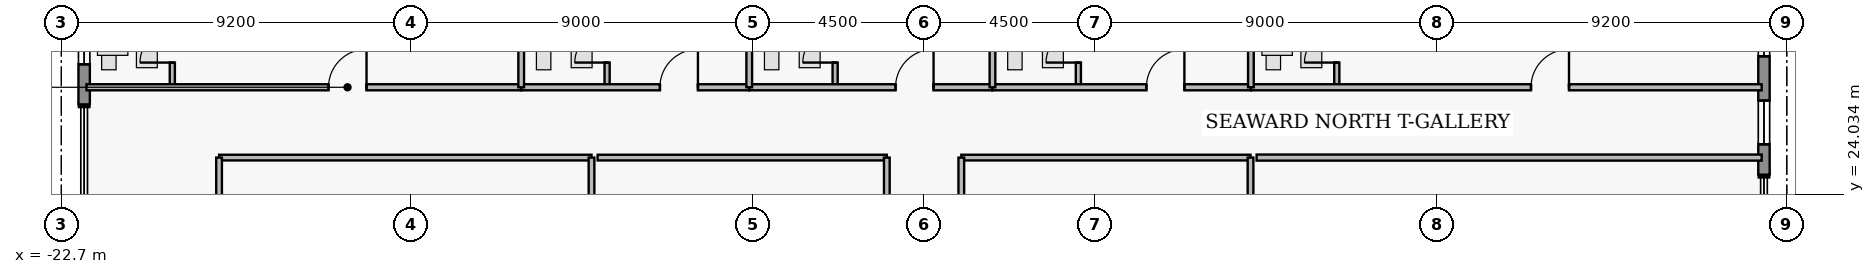
"""IFC4 building model, lengths in metres.
Left out: names, types, materials, properties, quantities, classifications, styles, units other than length and angle.
Written with IfcOpenShell. Run it as: python <this file> out.ifc"""

import sys

from ifc_helpers import new_model, si_unit, direction, frame, frame_2d, origin, place, context, subcontext, project, spatial, rectangle, extrude, element, fill, save


model = new_model("IFC4")
c1 = context("Model", 3, precision=1e-05, world=origin(), true_north=direction((0.0, 1.0)))
c2 = subcontext(c1, "Body", "Model", "MODEL_VIEW")
j1 = project(units=[si_unit("LENGTHUNIT", "METRE"), si_unit("PLANEANGLEUNIT", "RADIAN")], contexts=[c1])
p1 = place(None, origin())
s1 = spatial("IfcSite", under=j1, at=p1, CompositionType="ELEMENT")
p2 = place(p1, origin())
s2 = spatial("IfcBuilding", under=s1, at=p2, CompositionType="ELEMENT")
p3 = place(p2, frame((0.0, 0.0, 181.15)))
s3 = spatial("IfcBuildingStorey", under=s2, at=p3, CompositionType="ELEMENT", Elevation=181.15)
p4 = place(p3, frame((-22.1, 26.4, 0.0), z_axis=(0.0, 0.0, 1.0), x_axis=(0.0, 1.0, 0.0)))
e1 = element("IfcWall", 1, at=p4, inside=s3, PredefinedType="STANDARD", context=c2, shape_type="SweptSolid", body=[
    extrude(rectangle(XDim=3.8, YDim=0.3, at=frame_2d((1.9, 0.0))), origin(), (0.0, 0.0, 1.0), 3.53),
])
p5 = place(p4, frame((1.055, 0.0, 0.95)))
e2 = element("IfcOpeningElement", 2, at=p5, cuts=e1, PredefinedType="OPENING", context=c2, shape_type="SweptSolid", body=[
    extrude(rectangle(XDim=1.15, YDim=1.55, at=frame_2d((0.575, 0.775))), frame((0.0, 0.16, 0.0), z_axis=(0.0, -1.0, 0.0), x_axis=(1.0, 0.0, 0.0)), (0.0, 0.0, 1.0), 0.32),
])
p6 = place(p3, frame((22.1, 30.2, 0.0), z_axis=(0.0, 0.0, 1.0), x_axis=(0.0, -1.0, 0.0)))
e3 = element("IfcWall", 3, at=p6, inside=s3, PredefinedType="STANDARD", context=c2, shape_type="SweptSolid", body=[
    extrude(rectangle(XDim=5.65, YDim=0.3, at=frame_2d((2.825, 0.0))), origin(), (0.0, 0.0, 1.0), 3.53),
])
p7 = place(p6, frame((0.935, 0.0, 0.85)))
e4 = element("IfcOpeningElement", 4, at=p7, cuts=e3, PredefinedType="OPENING", context=c2, shape_type="SweptSolid", body=[
    extrude(rectangle(XDim=1.6, YDim=1.8, at=frame_2d((0.8, 0.9))), frame((0.0, 0.16, 0.0), z_axis=(0.0, -1.0, 0.0), x_axis=(1.0, 0.0, 0.0)), (0.0, 0.0, 1.0), 0.32),
])
p8 = place(p6, frame((3.7, 0.0, 0.95)))
e5 = element("IfcOpeningElement", 5, at=p8, cuts=e3, PredefinedType="OPENING", context=c2, shape_type="SweptSolid", body=[
    extrude(rectangle(XDim=1.15, YDim=1.55, at=frame_2d((0.575, 0.775))), frame((0.0, 0.16, 0.0), z_axis=(0.0, -1.0, 0.0), x_axis=(1.0, 0.0, 0.0)), (0.0, 0.0, 1.0), 0.32),
])
p9 = place(p3, frame((-19.78, 26.85, 0.0), z_axis=(0.0, 0.0, 1.0), x_axis=(0.0, 1.0, 0.0)))
e6 = element("IfcWall", 6, at=p9, inside=s3, PredefinedType="PLUMBINGWALL", context=c2, shape_type="SweptSolid", body=[
    extrude(rectangle(XDim=2.36, YDim=0.135, at=frame_2d((1.18, 0.0))), origin(), (0.0, 0.0, 1.0), 3.53),
])
p10 = place(p9, frame((0.65, 0.0, 0.0)))
e7 = element("IfcOpeningElement", 7, at=p10, cuts=e6, PredefinedType="OPENING", context=c2, shape_type="SweptSolid", body=[
    extrude(rectangle(XDim=0.85, YDim=2.1, at=frame_2d((0.425, 1.05))), frame((0.0, 0.077, 0.0), z_axis=(0.0, -1.0, 0.0), x_axis=(1.0, 0.0, 0.0)), (0.0, 0.0, 1.0), 0.155),
])
p11 = place(p3, frame((-22.04, 26.85, 0.0), z_axis=(0.0, 0.0, 1.0), x_axis=(1.0, 0.0, 0.0)))
e8 = element("IfcWall", 8, at=p11, inside=s3, PredefinedType="PARTITIONING", context=c2, shape_type="SweptSolid", body=[
    extrude(rectangle(XDim=11.44, YDim=0.16, at=frame_2d((5.72, 0.0))), origin(), (0.0, 0.0, 1.0), 3.53),
])
p12 = place(p11, frame((6.37, 0.0, 0.0)))
e9 = element("IfcOpeningElement", 9, at=p12, cuts=e8, PredefinedType="OPENING", context=c2, shape_type="SweptSolid", body=[
    extrude(rectangle(XDim=1.0, YDim=2.15, at=frame_2d((0.5, 1.075))), frame((0.0, 0.09, 0.0), z_axis=(0.0, -1.0, 0.0), x_axis=(1.0, 0.0, 0.0)), (0.0, 0.0, 1.0), 0.18),
])
p13 = place(p3, frame((-8.34, 26.85, 0.0), z_axis=(0.0, 0.0, 1.0), x_axis=(0.0, 1.0, 0.0)))
e10 = element("IfcWall", 10, at=p13, inside=s3, PredefinedType="PLUMBINGWALL", context=c2, shape_type="SweptSolid", body=[
    extrude(rectangle(XDim=2.36, YDim=0.135, at=frame_2d((1.18, 0.0))), origin(), (0.0, 0.0, 1.0), 3.53),
])
p14 = place(p13, frame((0.65, 0.0, 0.0)))
e11 = element("IfcOpeningElement", 11, at=p14, cuts=e10, PredefinedType="OPENING", context=c2, shape_type="SweptSolid", body=[
    extrude(rectangle(XDim=0.85, YDim=2.1, at=frame_2d((0.425, 1.05))), frame((0.0, 0.077, 0.0), z_axis=(0.0, -1.0, 0.0), x_axis=(1.0, 0.0, 0.0)), (0.0, 0.0, 1.0), 0.155),
])
p15 = place(p3, frame((-10.6, 26.85, 0.0), z_axis=(0.0, 0.0, 1.0), x_axis=(1.0, 0.0, 0.0)))
e12 = element("IfcWall", 12, at=p15, inside=s3, PredefinedType="PARTITIONING", context=c2, shape_type="SweptSolid", body=[
    extrude(rectangle(XDim=6.0, YDim=0.16, at=frame_2d((3.0, 0.0))), origin(), (0.0, 0.0, 1.0), 3.53),
])
p16 = place(p15, frame((3.65, 0.0, 0.0)))
e13 = element("IfcOpeningElement", 13, at=p16, cuts=e12, PredefinedType="OPENING", context=c2, shape_type="SweptSolid", body=[
    extrude(rectangle(XDim=1.0, YDim=2.15, at=frame_2d((0.5, 1.075))), frame((0.0, 0.09, 0.0), z_axis=(0.0, -1.0, 0.0), x_axis=(1.0, 0.0, 0.0)), (0.0, 0.0, 1.0), 0.18),
])
p17 = place(p3, frame((-2.34, 26.85, 0.0), z_axis=(0.0, 0.0, 1.0), x_axis=(0.0, 1.0, 0.0)))
e14 = element("IfcWall", 14, at=p17, inside=s3, PredefinedType="PLUMBINGWALL", context=c2, shape_type="SweptSolid", body=[
    extrude(rectangle(XDim=2.36, YDim=0.135, at=frame_2d((1.18, 0.0))), origin(), (0.0, 0.0, 1.0), 3.53),
])
p18 = place(p17, frame((0.65, 0.0, 0.0)))
e15 = element("IfcOpeningElement", 15, at=p18, cuts=e14, PredefinedType="OPENING", context=c2, shape_type="SweptSolid", body=[
    extrude(rectangle(XDim=0.85, YDim=2.1, at=frame_2d((0.425, 1.05))), frame((0.0, 0.077, 0.0), z_axis=(0.0, -1.0, 0.0), x_axis=(1.0, 0.0, 0.0)), (0.0, 0.0, 1.0), 0.155),
])
p19 = place(p3, frame((-4.6, 26.85, 0.0), z_axis=(0.0, 0.0, 1.0), x_axis=(1.0, 0.0, 0.0)))
e16 = element("IfcWall", 16, at=p19, inside=s3, PredefinedType="PARTITIONING", context=c2, shape_type="SweptSolid", body=[
    extrude(rectangle(XDim=6.4, YDim=0.16, at=frame_2d((3.2, 0.0))), origin(), (0.0, 0.0, 1.0), 3.53),
])
p20 = place(p19, frame((3.85, 0.0, 0.0)))
e17 = element("IfcOpeningElement", 17, at=p20, cuts=e16, PredefinedType="OPENING", context=c2, shape_type="SweptSolid", body=[
    extrude(rectangle(XDim=1.0, YDim=2.15, at=frame_2d((0.5, 1.075))), frame((0.0, 0.09, 0.0), z_axis=(0.0, -1.0, 0.0), x_axis=(1.0, 0.0, 0.0)), (0.0, 0.0, 1.0), 0.18),
])
p21 = place(p3, frame((4.06, 26.85, 0.0), z_axis=(0.0, 0.0, 1.0), x_axis=(0.0, 1.0, 0.0)))
e18 = element("IfcWall", 18, at=p21, inside=s3, PredefinedType="PLUMBINGWALL", context=c2, shape_type="SweptSolid", body=[
    extrude(rectangle(XDim=2.36, YDim=0.135, at=frame_2d((1.18, 0.0))), origin(), (0.0, 0.0, 1.0), 3.53),
])
p22 = place(p21, frame((0.65, 0.0, 0.0)))
e19 = element("IfcOpeningElement", 19, at=p22, cuts=e18, PredefinedType="OPENING", context=c2, shape_type="SweptSolid", body=[
    extrude(rectangle(XDim=0.85, YDim=2.1, at=frame_2d((0.425, 1.05))), frame((0.0, 0.077, 0.0), z_axis=(0.0, -1.0, 0.0), x_axis=(1.0, 0.0, 0.0)), (0.0, 0.0, 1.0), 0.155),
])
p23 = place(p3, frame((1.8, 26.85, 0.0), z_axis=(0.0, 0.0, 1.0), x_axis=(1.0, 0.0, 0.0)))
e20 = element("IfcWall", 20, at=p23, inside=s3, PredefinedType="PARTITIONING", context=c2, shape_type="SweptSolid", body=[
    extrude(rectangle(XDim=6.8, YDim=0.16, at=frame_2d((3.4, 0.0))), origin(), (0.0, 0.0, 1.0), 3.53),
])
p24 = place(p23, frame((4.05, 0.0, 0.0)))
e21 = element("IfcOpeningElement", 21, at=p24, cuts=e20, PredefinedType="OPENING", context=c2, shape_type="SweptSolid", body=[
    extrude(rectangle(XDim=1.0, YDim=2.15, at=frame_2d((0.5, 1.075))), frame((0.0, 0.09, 0.0), z_axis=(0.0, -1.0, 0.0), x_axis=(1.0, 0.0, 0.0)), (0.0, 0.0, 1.0), 0.18),
])
p25 = place(p3, frame((10.86, 26.85, 0.0), z_axis=(0.0, 0.0, 1.0), x_axis=(0.0, 1.0, 0.0)))
e22 = element("IfcWall", 22, at=p25, inside=s3, PredefinedType="PLUMBINGWALL", context=c2, shape_type="SweptSolid", body=[
    extrude(rectangle(XDim=2.36, YDim=0.135, at=frame_2d((1.18, 0.0))), origin(), (0.0, 0.0, 1.0), 3.53),
])
p26 = place(p25, frame((0.65, 0.0, 0.0)))
e23 = element("IfcOpeningElement", 23, at=p26, cuts=e22, PredefinedType="OPENING", context=c2, shape_type="SweptSolid", body=[
    extrude(rectangle(XDim=0.85, YDim=2.1, at=frame_2d((0.425, 1.05))), frame((0.0, 0.077, 0.0), z_axis=(0.0, -1.0, 0.0), x_axis=(1.0, 0.0, 0.0)), (0.0, 0.0, 1.0), 0.155),
])
p27 = place(p3, frame((8.6, 26.85, 0.0), z_axis=(0.0, 0.0, 1.0), x_axis=(1.0, 0.0, 0.0)))
e24 = element("IfcWall", 24, at=p27, inside=s3, PredefinedType="PARTITIONING", context=c2, shape_type="SweptSolid", body=[
    extrude(rectangle(XDim=13.44, YDim=0.16, at=frame_2d((6.72, 0.0))), origin(), (0.0, 0.0, 1.0), 3.53),
])
p28 = place(p27, frame((7.37, 0.0, 0.0)))
e25 = element("IfcOpeningElement", 25, at=p28, cuts=e24, PredefinedType="OPENING", context=c2, shape_type="SweptSolid", body=[
    extrude(rectangle(XDim=1.0, YDim=2.15, at=frame_2d((0.5, 1.075))), frame((0.0, 0.09, 0.0), z_axis=(0.0, -1.0, 0.0), x_axis=(1.0, 0.0, 0.0)), (0.0, 0.0, 1.0), 0.18),
])
p29 = place(p3, frame((-10.6, 26.85, 0.0), z_axis=(0.0, 0.0, 1.0), x_axis=(0.0, 1.0, 0.0)))
e26 = element("IfcWall", 26, at=p29, inside=s3, PredefinedType="PARTITIONING", context=c2, shape_type="SweptSolid", body=[
    extrude(rectangle(XDim=6.67, YDim=0.15, at=frame_2d((3.335, 0.0))), origin(), (0.0, 0.0, 1.0), 3.53),
])
p30 = place(p3, frame((-4.6, 26.85, 0.0), z_axis=(0.0, 0.0, 1.0), x_axis=(0.0, 1.0, 0.0)))
e27 = element("IfcWall", 27, at=p30, inside=s3, PredefinedType="PARTITIONING", context=c2, shape_type="SweptSolid", body=[
    extrude(rectangle(XDim=6.67, YDim=0.15, at=frame_2d((3.335, 0.0))), origin(), (0.0, 0.0, 1.0), 2.519),
])
for number, where, z_axis, x_axis in (
    (28, (1.8, 26.85, 0.0), (0.0, 0.0, 1.0), (0.0, 1.0, 0.0)),
    (29, (8.6, 26.85, 0.0), (0.0, 0.0, 1.0), (0.0, 1.0, 0.0)),
):
    element("IfcWall", number, at=place(p3, frame(where, z_axis=z_axis, x_axis=x_axis)), inside=s3, PredefinedType="PARTITIONING", context=c2, shape_type="SweptSolid", body=[
        extrude(rectangle(XDim=6.67, YDim=0.15, at=frame_2d((3.335, 0.0))), origin(), (0.0, 0.0, 1.0), 3.53),
    ])
p31 = place(p3, frame((-18.55, 25.0, 0.0), z_axis=(0.0, 0.0, 1.0), x_axis=(1.0, 0.0, 0.0)))
e30 = element("IfcWall", 30, at=p31, inside=s3, PredefinedType="PARTITIONING", context=c2, shape_type="SweptSolid", body=[
    extrude(rectangle(XDim=9.8, YDim=0.15, at=frame_2d((4.9, 0.0))), origin(), (0.0, 0.0, 1.0), 3.124),
])
for number, where, z_axis, x_axis in (
    (31, (-18.55, 16.7, 0.0), (0.0, 0.0, 1.0), (0.0, 1.0, 0.0)),
    (32, (-8.75, 16.7, 0.0), (0.0, 0.0, 1.0), (0.0, 1.0, 0.0)),
):
    element("IfcWall", number, at=place(p3, frame(where, z_axis=z_axis, x_axis=x_axis)), inside=s3, PredefinedType="PARTITIONING", context=c2, shape_type="SweptSolid", body=[
        extrude(rectangle(XDim=8.3, YDim=0.15, at=frame_2d((4.15, 0.0))), origin(), (0.0, 0.0, 1.0), 3.53),
    ])
p32 = place(p3, frame((-8.59, 25.0, 0.0), z_axis=(0.0, 0.0, 1.0), x_axis=(1.0, 0.0, 0.0)))
e33 = element("IfcWall", 33, at=p32, inside=s3, PredefinedType="PARTITIONING", context=c2, shape_type="SweptSolid", body=[
    extrude(rectangle(XDim=7.61, YDim=0.15, at=frame_2d((3.805, 0.0))), origin(), (0.0, 0.0, 1.0), 3.124),
])
p33 = place(p3, frame((-0.98, 16.7, 0.0), z_axis=(0.0, 0.0, 1.0), x_axis=(0.0, 1.0, 0.0)))
e34 = element("IfcWall", 34, at=p33, inside=s3, PredefinedType="PARTITIONING", context=c2, shape_type="SweptSolid", body=[
    extrude(rectangle(XDim=8.3, YDim=0.15, at=frame_2d((4.15, 0.0))), origin(), (0.0, 0.0, 1.0), 3.53),
])
p34 = place(p3, frame((0.98, 25.0, 0.0), z_axis=(0.0, 0.0, 1.0), x_axis=(1.0, 0.0, 0.0)))
e35 = element("IfcWall", 35, at=p34, inside=s3, PredefinedType="PARTITIONING", context=c2, shape_type="SweptSolid", body=[
    extrude(rectangle(XDim=7.61, YDim=0.15, at=frame_2d((3.805, 0.0))), origin(), (0.0, 0.0, 1.0), 3.124),
])
for number, where, z_axis, x_axis in (
    (36, (0.98, 16.7, 0.0), (0.0, 0.0, 1.0), (0.0, 1.0, 0.0)),
    (37, (8.59, 16.7, 0.0), (0.0, 0.0, 1.0), (0.0, 1.0, 0.0)),
):
    element("IfcWall", number, at=place(p3, frame(where, z_axis=z_axis, x_axis=x_axis)), inside=s3, PredefinedType="PARTITIONING", context=c2, shape_type="SweptSolid", body=[
        extrude(rectangle(XDim=8.3, YDim=0.15, at=frame_2d((4.15, 0.0))), origin(), (0.0, 0.0, 1.0), 3.53),
    ])
p35 = place(p3, frame((8.75, 25.0, 0.0), z_axis=(0.0, 0.0, 1.0), x_axis=(1.0, 0.0, 0.0)))
e38 = element("IfcWall", 38, at=p35, inside=s3, PredefinedType="PARTITIONING", context=c2, shape_type="SweptSolid", body=[
    extrude(rectangle(XDim=13.29, YDim=0.16, at=frame_2d((6.645, 0.0))), origin(), (0.0, 0.0, 1.0), 3.124),
])
p36 = place(p5, origin())
e39 = element("IfcWindow", 39, at=p36, inside=s3, PartitioningType="SINGLE_PANEL", PredefinedType="WINDOW", context=c2, shape_type="SweptSolid", body=[
    extrude(rectangle(XDim=1.15, YDim=1.55, at=frame_2d((0.575, 0.775))), frame((0.0, 0.03, 0.0), z_axis=(0.0, -1.0, 0.0), x_axis=(1.0, 0.0, 0.0)), (0.0, 0.0, 1.0), 0.06),
])
fill(e2, e39)
p37 = place(p7, origin())
e40 = element("IfcWindow", 40, at=p37, inside=s3, PartitioningType="SINGLE_PANEL", PredefinedType="WINDOW", context=c2, shape_type="SweptSolid", body=[
    extrude(rectangle(XDim=1.6, YDim=1.8, at=frame_2d((0.8, 0.9))), frame((0.0, 0.03, 0.0), z_axis=(0.0, -1.0, 0.0), x_axis=(1.0, 0.0, 0.0)), (0.0, 0.0, 1.0), 0.06),
])
fill(e4, e40)
p38 = place(p8, origin())
e41 = element("IfcWindow", 41, at=p38, inside=s3, PartitioningType="SINGLE_PANEL", PredefinedType="WINDOW", context=c2, shape_type="SweptSolid", body=[
    extrude(rectangle(XDim=1.15, YDim=1.55, at=frame_2d((0.575, 0.775))), frame((0.0, 0.03, 0.0), z_axis=(0.0, -1.0, 0.0), x_axis=(1.0, 0.0, 0.0)), (0.0, 0.0, 1.0), 0.06),
])
fill(e5, e41)
p39 = place(p10, origin())
e42 = element("IfcDoor", 42, at=p39, inside=s3, OperationType="SINGLE_SWING_LEFT", PredefinedType="DOOR", context=c2, shape_type="SweptSolid", body=[
    extrude(rectangle(XDim=0.85, YDim=2.1, at=frame_2d((0.425, 1.05))), frame((0.0, 0.025, 0.0), z_axis=(0.0, -1.0, 0.0), x_axis=(1.0, 0.0, 0.0)), (0.0, 0.0, 1.0), 0.05),
])
fill(e7, e42)
p40 = place(p12, origin())
e43 = element("IfcDoor", 43, at=p40, inside=s3, OperationType="SINGLE_SWING_RIGHT", PredefinedType="DOOR", context=c2, shape_type="SweptSolid", body=[
    extrude(rectangle(XDim=1.0, YDim=2.15, at=frame_2d((0.5, 1.075))), frame((0.0, 0.025, 0.0), z_axis=(0.0, -1.0, 0.0), x_axis=(1.0, 0.0, 0.0)), (0.0, 0.0, 1.0), 0.05),
])
fill(e9, e43)
p41 = place(p14, origin())
e44 = element("IfcDoor", 44, at=p41, inside=s3, OperationType="SINGLE_SWING_LEFT", PredefinedType="DOOR", context=c2, shape_type="SweptSolid", body=[
    extrude(rectangle(XDim=0.85, YDim=2.1, at=frame_2d((0.425, 1.05))), frame((0.0, 0.025, 0.0), z_axis=(0.0, -1.0, 0.0), x_axis=(1.0, 0.0, 0.0)), (0.0, 0.0, 1.0), 0.05),
])
fill(e11, e44)
p42 = place(p16, origin())
e45 = element("IfcDoor", 45, at=p42, inside=s3, OperationType="SINGLE_SWING_RIGHT", PredefinedType="DOOR", context=c2, shape_type="SweptSolid", body=[
    extrude(rectangle(XDim=1.0, YDim=2.15, at=frame_2d((0.5, 1.075))), frame((0.0, 0.025, 0.0), z_axis=(0.0, -1.0, 0.0), x_axis=(1.0, 0.0, 0.0)), (0.0, 0.0, 1.0), 0.05),
])
fill(e13, e45)
p43 = place(p18, origin())
e46 = element("IfcDoor", 46, at=p43, inside=s3, OperationType="SINGLE_SWING_LEFT", PredefinedType="DOOR", context=c2, shape_type="SweptSolid", body=[
    extrude(rectangle(XDim=0.85, YDim=2.1, at=frame_2d((0.425, 1.05))), frame((0.0, 0.025, 0.0), z_axis=(0.0, -1.0, 0.0), x_axis=(1.0, 0.0, 0.0)), (0.0, 0.0, 1.0), 0.05),
])
fill(e15, e46)
p44 = place(p20, origin())
e47 = element("IfcDoor", 47, at=p44, inside=s3, OperationType="SINGLE_SWING_RIGHT", PredefinedType="DOOR", context=c2, shape_type="SweptSolid", body=[
    extrude(rectangle(XDim=1.0, YDim=2.15, at=frame_2d((0.5, 1.075))), frame((0.0, 0.025, 0.0), z_axis=(0.0, -1.0, 0.0), x_axis=(1.0, 0.0, 0.0)), (0.0, 0.0, 1.0), 0.05),
])
fill(e17, e47)
p45 = place(p22, origin())
e48 = element("IfcDoor", 48, at=p45, inside=s3, OperationType="SINGLE_SWING_LEFT", PredefinedType="DOOR", context=c2, shape_type="SweptSolid", body=[
    extrude(rectangle(XDim=0.85, YDim=2.1, at=frame_2d((0.425, 1.05))), frame((0.0, 0.025, 0.0), z_axis=(0.0, -1.0, 0.0), x_axis=(1.0, 0.0, 0.0)), (0.0, 0.0, 1.0), 0.05),
])
fill(e19, e48)
p46 = place(p24, origin())
e49 = element("IfcDoor", 49, at=p46, inside=s3, OperationType="SINGLE_SWING_RIGHT", PredefinedType="DOOR", context=c2, shape_type="SweptSolid", body=[
    extrude(rectangle(XDim=1.0, YDim=2.15, at=frame_2d((0.5, 1.075))), frame((0.0, 0.025, 0.0), z_axis=(0.0, -1.0, 0.0), x_axis=(1.0, 0.0, 0.0)), (0.0, 0.0, 1.0), 0.05),
])
fill(e21, e49)
p47 = place(p26, origin())
e50 = element("IfcDoor", 50, at=p47, inside=s3, OperationType="SINGLE_SWING_LEFT", PredefinedType="DOOR", context=c2, shape_type="SweptSolid", body=[
    extrude(rectangle(XDim=0.85, YDim=2.1, at=frame_2d((0.425, 1.05))), frame((0.0, 0.025, 0.0), z_axis=(0.0, -1.0, 0.0), x_axis=(1.0, 0.0, 0.0)), (0.0, 0.0, 1.0), 0.05),
])
fill(e23, e50)
p48 = place(p28, origin())
e51 = element("IfcDoor", 51, at=p48, inside=s3, OperationType="SINGLE_SWING_RIGHT", PredefinedType="DOOR", context=c2, shape_type="SweptSolid", body=[
    extrude(rectangle(XDim=1.0, YDim=2.15, at=frame_2d((0.5, 1.075))), frame((0.0, 0.025, 0.0), z_axis=(0.0, -1.0, 0.0), x_axis=(1.0, 0.0, 0.0)), (0.0, 0.0, 1.0), 0.05),
])
fill(e25, e51)
save(model, sys.argv[1])
